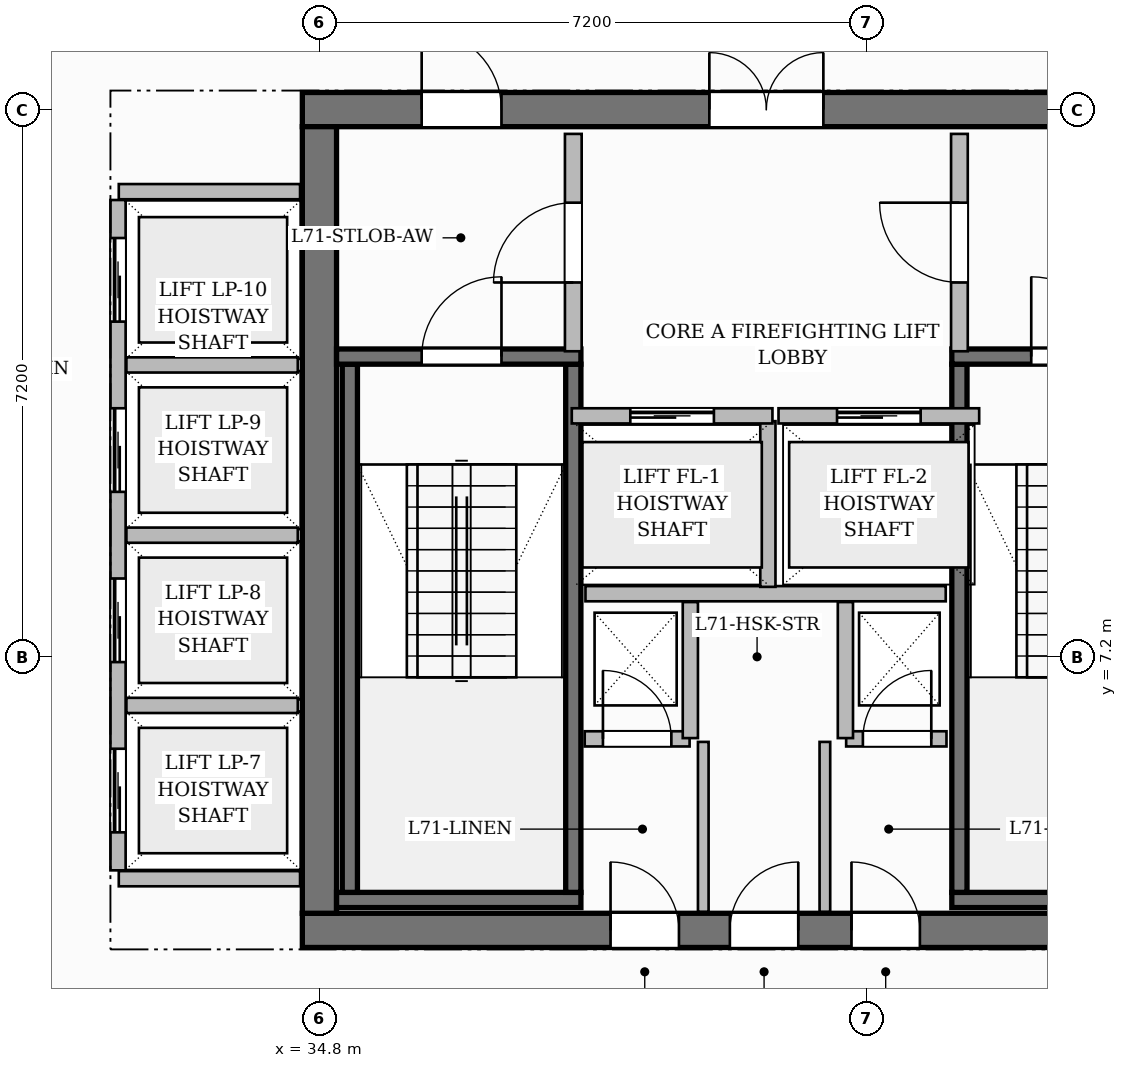
"""IFC4 building model, lengths in metres.
Left out: names, types, materials, properties, quantities, classifications, styles, units other than length and angle.
Written with IfcOpenShell. Run it as: python <this file> out.ifc"""

import sys

from ifc_helpers import new_model, si_unit, direction, frame, frame_2d, origin, place, context, subcontext, project, spatial, rectangle, extrude, source, transform, mapped, element, fill, save


model = new_model("IFC4")
c1 = context("Model", 3, precision=1e-05, world=origin(), true_north=direction((0.0, 1.0)))
c2 = subcontext(c1, "Body", "Model", "MODEL_VIEW")
j1 = project(units=[si_unit("LENGTHUNIT", "METRE"), si_unit("PLANEANGLEUNIT", "RADIAN")], contexts=[c1])
p1 = place(None, origin())
s1 = spatial("IfcSite", under=j1, at=p1, CompositionType="ELEMENT")
p2 = place(p1, origin())
s2 = spatial("IfcBuilding", under=s1, at=p2, CompositionType="ELEMENT")
p3 = place(p2, frame((0.0, 0.0, 282.75)))
s3 = spatial("IfcBuildingStorey", under=s2, at=p3, CompositionType="ELEMENT", Elevation=282.75)
p4 = place(p3, frame((34.575, 3.6, 0.0), z_axis=(0.0, 0.0, 1.0), x_axis=(1.0, 0.0, 0.0)))
e1 = element("IfcWall", 1, at=p4, inside=s3, PredefinedType="SHEAR", context=c2, shape_type="SweptSolid", body=[
    extrude(rectangle(XDim=15.45, YDim=0.45, at=frame_2d((7.725, 0.0))), origin(), (0.0, 0.0, 1.0), 3.85),
])
p5 = place(p4, frame((4.055, 0.0, 0.0)))
e2 = element("IfcOpeningElement", 2, at=p5, cuts=e1, PredefinedType="OPENING", context=c2, shape_type="SweptSolid", body=[
    extrude(rectangle(XDim=0.9, YDim=2.1, at=frame_2d((0.45, 1.05))), frame((0.0, 0.235, 0.0), z_axis=(0.0, -1.0, 0.0), x_axis=(1.0, 0.0, 0.0)), (0.0, 0.0, 1.0), 0.47),
])
p6 = place(p4, frame((5.625, 0.0, 0.0)))
e3 = element("IfcOpeningElement", 3, at=p6, cuts=e1, PredefinedType="OPENING", context=c2, shape_type="SweptSolid", body=[
    extrude(rectangle(XDim=0.9, YDim=2.1, at=frame_2d((0.45, 1.05))), frame((0.0, 0.235, 0.0), z_axis=(0.0, -1.0, 0.0), x_axis=(1.0, 0.0, 0.0)), (0.0, 0.0, 1.0), 0.47),
])
p7 = place(p4, frame((7.225, 0.0, 0.0)))
e4 = element("IfcOpeningElement", 4, at=p7, cuts=e1, PredefinedType="OPENING", context=c2, shape_type="SweptSolid", body=[
    extrude(rectangle(XDim=0.9, YDim=2.1, at=frame_2d((0.45, 1.05))), frame((0.0, 0.235, 0.0), z_axis=(0.0, -1.0, 0.0), x_axis=(1.0, 0.0, 0.0)), (0.0, 0.0, 1.0), 0.47),
])
p8 = place(p3, frame((34.575, 14.4, 0.0), z_axis=(0.0, 0.0, 1.0), x_axis=(1.0, 0.0, 0.0)))
e5 = element("IfcWall", 5, at=p8, inside=s3, PredefinedType="SHEAR", context=c2, shape_type="SweptSolid", body=[
    extrude(rectangle(XDim=15.45, YDim=0.45, at=frame_2d((7.725, 0.0))), origin(), (0.0, 0.0, 1.0), 3.85),
])
p9 = place(p8, frame((5.355, 0.0, 0.0)))
e6 = element("IfcOpeningElement", 6, at=p9, cuts=e5, PredefinedType="OPENING", context=c2, shape_type="SweptSolid", body=[
    extrude(rectangle(XDim=1.5, YDim=2.2, at=frame_2d((0.75, 1.1))), frame((0.0, 0.235, 0.0), z_axis=(0.0, -1.0, 0.0), x_axis=(1.0, 0.0, 0.0)), (0.0, 0.0, 1.0), 0.47),
])
p10 = place(p8, frame((1.57, 0.0, 0.0)))
e7 = element("IfcOpeningElement", 7, at=p10, cuts=e5, PredefinedType="OPENING", context=c2, shape_type="SweptSolid", body=[
    extrude(rectangle(XDim=1.05, YDim=2.15, at=frame_2d((0.525, 1.075))), frame((0.0, 0.235, 0.0), z_axis=(0.0, -1.0, 0.0), x_axis=(1.0, 0.0, 0.0)), (0.0, 0.0, 1.0), 0.47),
])
p11 = place(p8, frame((11.2, 0.0, 0.0)))
e8 = element("IfcOpeningElement", 8, at=p11, cuts=e5, PredefinedType="OPENING", context=c2, shape_type="SweptSolid", body=[
    extrude(rectangle(XDim=1.05, YDim=2.15, at=frame_2d((0.525, 1.075))), frame((0.0, 0.235, 0.0), z_axis=(0.0, -1.0, 0.0), x_axis=(1.0, 0.0, 0.0)), (0.0, 0.0, 1.0), 0.47),
])
p12 = place(p3, frame((34.8, 3.825, 0.0), z_axis=(0.0, 0.0, 1.0), x_axis=(0.0, 1.0, 0.0)))
e9 = element("IfcWall", 9, at=p12, inside=s3, PredefinedType="SHEAR", context=c2, shape_type="SweptSolid", body=[
    extrude(rectangle(XDim=10.35, YDim=0.45, at=frame_2d((5.175, 0.0))), origin(), (0.0, 0.0, 1.0), 3.85),
])
p13 = place(p3, frame((35.025, 4.0, 0.0), z_axis=(0.0, 0.0, 1.0), x_axis=(1.0, 0.0, 0.0)))
e10 = element("IfcWall", 10, at=p13, inside=s3, PredefinedType="SHEAR", context=c2, shape_type="SweptSolid", body=[
    extrude(rectangle(XDim=3.215, YDim=0.2, at=frame_2d((1.607, 0.0))), origin(), (0.0, 0.0, 1.0), 3.85),
])
for number, where, z_axis, x_axis in (
    (11, (35.2, 4.1, 0.0), (0.0, 0.0, 1.0), (0.0, 1.0, 0.0)),
    (12, (38.14, 4.1, 0.0), (0.0, 0.0, 1.0), (0.0, 1.0, 0.0)),
):
    element("IfcWall", number, at=place(p3, frame(where, z_axis=z_axis, x_axis=x_axis)), inside=s3, PredefinedType="SHEAR", context=c2, shape_type="SweptSolid", body=[
        extrude(rectangle(XDim=6.95, YDim=0.2, at=frame_2d((3.475, 0.0))), origin(), (0.0, 0.0, 1.0), 3.85),
    ])
p14 = place(p3, frame((35.025, 11.15, 0.0), z_axis=(0.0, 0.0, 1.0), x_axis=(1.0, 0.0, 0.0)))
e13 = element("IfcWall", 13, at=p14, inside=s3, PredefinedType="SHEAR", context=c2, shape_type="SweptSolid", body=[
    extrude(rectangle(XDim=3.215, YDim=0.2, at=frame_2d((1.607, 0.0))), origin(), (0.0, 0.0, 1.0), 3.85),
])
p15 = place(p14, frame((1.12, 0.0, 0.0)))
e14 = element("IfcOpeningElement", 14, at=p15, cuts=e13, PredefinedType="OPENING", context=c2, shape_type="SweptSolid", body=[
    extrude(rectangle(XDim=1.05, YDim=2.2, at=frame_2d((0.525, 1.1))), frame((0.0, 0.11, 0.0), z_axis=(0.0, -1.0, 0.0), x_axis=(1.0, 0.0, 0.0)), (0.0, 0.0, 1.0), 0.22),
])
p16 = place(p3, frame((43.12, 4.0, 0.0), z_axis=(0.0, 0.0, 1.0), x_axis=(1.0, 0.0, 0.0)))
e15 = element("IfcWall", 15, at=p16, inside=s3, PredefinedType="SHEAR", context=c2, shape_type="SweptSolid", body=[
    extrude(rectangle(XDim=6.455, YDim=0.2, at=frame_2d((3.228, 0.0))), origin(), (0.0, 0.0, 1.0), 3.85),
])
p17 = place(p3, frame((43.22, 4.1, 0.0), z_axis=(0.0, 0.0, 1.0), x_axis=(0.0, 1.0, 0.0)))
e16 = element("IfcWall", 16, at=p17, inside=s3, PredefinedType="SHEAR", context=c2, shape_type="SweptSolid", body=[
    extrude(rectangle(XDim=6.95, YDim=0.2, at=frame_2d((3.475, 0.0))), origin(), (0.0, 0.0, 1.0), 3.85),
])
p18 = place(p3, frame((43.12, 11.15, 0.0), z_axis=(0.0, 0.0, 1.0), x_axis=(1.0, 0.0, 0.0)))
e17 = element("IfcWall", 17, at=p18, inside=s3, PredefinedType="SHEAR", context=c2, shape_type="SweptSolid", body=[
    extrude(rectangle(XDim=6.455, YDim=0.2, at=frame_2d((3.228, 0.0))), origin(), (0.0, 0.0, 1.0), 3.85),
])
p19 = place(p18, frame((1.045, 0.0, 0.0)))
e18 = element("IfcOpeningElement", 18, at=p19, cuts=e17, PredefinedType="OPENING", context=c2, shape_type="SweptSolid", body=[
    extrude(rectangle(XDim=1.05, YDim=2.2, at=frame_2d((0.525, 1.1))), frame((0.0, 0.11, 0.0), z_axis=(0.0, -1.0, 0.0), x_axis=(1.0, 0.0, 0.0)), (0.0, 0.0, 1.0), 0.22),
])
p20 = place(p18, frame((4.125, 0.0, 0.0)))
e19 = element("IfcOpeningElement", 19, at=p20, cuts=e17, PredefinedType="OPENING", context=c2, shape_type="SweptSolid", body=[
    extrude(rectangle(XDim=1.05, YDim=2.2, at=frame_2d((0.525, 1.1))), frame((0.0, 0.11, 0.0), z_axis=(0.0, -1.0, 0.0), x_axis=(1.0, 0.0, 0.0)), (0.0, 0.0, 1.0), 0.22),
])
p21 = place(p3, frame((38.3, 8.03, 0.0), z_axis=(0.0, 0.0, 1.0), x_axis=(1.0, 0.0, 0.0)))
e20 = element("IfcWall", 20, at=p21, inside=s3, PredefinedType="PARTITIONING", context=c2, shape_type="SweptSolid", body=[
    extrude(rectangle(XDim=4.74, YDim=0.2, at=frame_2d((2.37, 0.0))), origin(), (0.0, 0.0, 1.0), 3.6),
])
p22 = place(p3, frame((40.7, 8.12, 0.0), z_axis=(0.0, 0.0, 1.0), x_axis=(0.0, 1.0, 0.0)))
e21 = element("IfcWall", 21, at=p22, inside=s3, PredefinedType="PARTITIONING", context=c2, shape_type="SweptSolid", body=[
    extrude(rectangle(XDim=2.18, YDim=0.2, at=frame_2d((1.09, 0.0))), origin(), (0.0, 0.0, 1.0), 3.6),
])
p23 = place(p3, frame((38.14, 11.22, 0.0), z_axis=(0.0, 0.0, 1.0), x_axis=(0.0, 1.0, 0.0)))
e22 = element("IfcWall", 22, at=p23, inside=s3, PredefinedType="PARTITIONING", context=c2, shape_type="SweptSolid", body=[
    extrude(rectangle(XDim=2.86, YDim=0.22, at=frame_2d((1.43, 0.0))), origin(), (0.0, 0.0, 1.0), 3.6),
])
p24 = place(p23, frame((0.905, 0.0, 0.0)))
e23 = element("IfcOpeningElement", 23, at=p24, cuts=e22, PredefinedType="OPENING", context=c2, shape_type="SweptSolid", body=[
    extrude(rectangle(XDim=1.05, YDim=2.15, at=frame_2d((0.525, 1.075))), frame((0.0, 0.12, 0.0), z_axis=(0.0, -1.0, 0.0), x_axis=(1.0, 0.0, 0.0)), (0.0, 0.0, 1.0), 0.24),
])
p25 = place(p3, frame((43.22, 11.22, 0.0), z_axis=(0.0, 0.0, 1.0), x_axis=(0.0, 1.0, 0.0)))
e24 = element("IfcWall", 24, at=p25, inside=s3, PredefinedType="PARTITIONING", context=c2, shape_type="SweptSolid", body=[
    extrude(rectangle(XDim=2.86, YDim=0.22, at=frame_2d((1.43, 0.0))), origin(), (0.0, 0.0, 1.0), 3.6),
])
p26 = place(p25, frame((0.905, 0.0, 0.0)))
e25 = element("IfcOpeningElement", 25, at=p26, cuts=e24, PredefinedType="OPENING", context=c2, shape_type="SweptSolid", body=[
    extrude(rectangle(XDim=1.05, YDim=2.15, at=frame_2d((0.525, 1.075))), frame((0.0, 0.12, 0.0), z_axis=(0.0, -1.0, 0.0), x_axis=(1.0, 0.0, 0.0)), (0.0, 0.0, 1.0), 0.24),
])
p27 = place(p3, frame((38.29, 6.12, 0.0), z_axis=(0.0, 0.0, 1.0), x_axis=(1.0, 0.0, 0.0)))
e26 = element("IfcWall", 26, at=p27, inside=s3, PredefinedType="PARTITIONING", context=c2, shape_type="SweptSolid", body=[
    extrude(rectangle(XDim=1.38, YDim=0.2, at=frame_2d((0.69, 0.0))), origin(), (0.0, 0.0, 1.0), 3.6),
])
p28 = place(p27, frame((0.24, 0.0, 0.0)))
e27 = element("IfcOpeningElement", 27, at=p28, cuts=e26, PredefinedType="OPENING", context=c2, shape_type="SweptSolid", body=[
    extrude(rectangle(XDim=0.9, YDim=2.1, at=frame_2d((0.45, 1.05))), frame((0.0, 0.11, 0.0), z_axis=(0.0, -1.0, 0.0), x_axis=(1.0, 0.0, 0.0)), (0.0, 0.0, 1.0), 0.22),
])
p29 = place(p3, frame((39.68, 6.13, 0.0), z_axis=(0.0, 0.0, 1.0), x_axis=(0.0, 1.0, 0.0)))
e28 = element("IfcWall", 28, at=p29, inside=s3, PredefinedType="PARTITIONING", context=c2, shape_type="SweptSolid", body=[
    extrude(rectangle(XDim=1.79, YDim=0.2, at=frame_2d((0.895, 0.0))), origin(), (0.0, 0.0, 1.0), 3.6),
])
p30 = place(p3, frame((41.73, 6.12, 0.0), z_axis=(0.0, 0.0, 1.0), x_axis=(1.0, 0.0, 0.0)))
e29 = element("IfcWall", 29, at=p30, inside=s3, PredefinedType="PARTITIONING", context=c2, shape_type="SweptSolid", body=[
    extrude(rectangle(XDim=1.32, YDim=0.2, at=frame_2d((0.66, 0.0))), origin(), (0.0, 0.0, 1.0), 3.6),
])
p31 = place(p30, frame((0.22, 0.0, 0.0)))
e30 = element("IfcOpeningElement", 30, at=p31, cuts=e29, PredefinedType="OPENING", context=c2, shape_type="SweptSolid", body=[
    extrude(rectangle(XDim=0.9, YDim=2.1, at=frame_2d((0.45, 1.05))), frame((0.0, 0.11, 0.0), z_axis=(0.0, -1.0, 0.0), x_axis=(1.0, 0.0, 0.0)), (0.0, 0.0, 1.0), 0.22),
])
p32 = place(p3, frame((41.72, 6.13, 0.0), z_axis=(0.0, 0.0, 1.0), x_axis=(0.0, 1.0, 0.0)))
e31 = element("IfcWall", 31, at=p32, inside=s3, PredefinedType="PARTITIONING", context=c2, shape_type="SweptSolid", body=[
    extrude(rectangle(XDim=1.79, YDim=0.2, at=frame_2d((0.895, 0.0))), origin(), (0.0, 0.0, 1.0), 3.6),
])
for number, where, z_axis, x_axis in (
    (32, (39.85, 3.845, 0.0), (0.0, 0.0, 1.0), (0.0, 1.0, 0.0)),
    (33, (41.45, 3.845, 0.0), (0.0, 0.0, 1.0), (0.0, 1.0, 0.0)),
):
    element("IfcWall", number, at=place(p3, frame(where, z_axis=z_axis, x_axis=x_axis)), inside=s3, PredefinedType="PARTITIONING", context=c2, shape_type="SweptSolid", body=[
        extrude(rectangle(XDim=2.235, YDim=0.14, at=frame_2d((1.118, 0.0))), origin(), (0.0, 0.0, 1.0), 3.6),
    ])
for number, where, z_axis, x_axis in (
    (34, (32.16, 4.28, 0.0), (0.0, 0.0, 1.0), (1.0, 0.0, 0.0)),
    (35, (32.16, 13.32, 0.0), (0.0, 0.0, 1.0), (1.0, 0.0, 0.0)),
):
    element("IfcWall", number, at=place(p3, frame(where, z_axis=z_axis, x_axis=x_axis)), inside=s3, PredefinedType="PARTITIONING", context=c2, shape_type="SweptSolid", body=[
        extrude(rectangle(XDim=2.385, YDim=0.2, at=frame_2d((1.192, 0.0))), origin(), (0.0, 0.0, 1.0), 3.6),
    ])
p33 = place(p3, frame((32.15, 4.39, 0.0), z_axis=(0.0, 0.0, 1.0), x_axis=(0.0, 1.0, 0.0)))
e36 = element("IfcWall", 36, at=p33, inside=s3, PredefinedType="PARTITIONING", context=c2, shape_type="SweptSolid", body=[
    extrude(rectangle(XDim=8.82, YDim=0.2, at=frame_2d((4.41, 0.0))), origin(), (0.0, 0.0, 1.0), 3.6),
])
p34 = place(p33, frame((0.5, 0.0, 0.0)))
e37 = element("IfcOpeningElement", 37, at=p34, cuts=e36, PredefinedType="OPENING", context=c2, shape_type="SweptSolid", body=[
    extrude(rectangle(XDim=1.1, YDim=2.2, at=frame_2d((0.55, 1.1))), frame((0.0, 0.11, 0.0), z_axis=(0.0, -1.0, 0.0), x_axis=(1.0, 0.0, 0.0)), (0.0, 0.0, 1.0), 0.22),
])
p35 = place(p33, frame((2.74, 0.0, 0.0)))
e38 = element("IfcOpeningElement", 38, at=p35, cuts=e36, PredefinedType="OPENING", context=c2, shape_type="SweptSolid", body=[
    extrude(rectangle(XDim=1.1, YDim=2.2, at=frame_2d((0.55, 1.1))), frame((0.0, 0.11, 0.0), z_axis=(0.0, -1.0, 0.0), x_axis=(1.0, 0.0, 0.0)), (0.0, 0.0, 1.0), 0.22),
])
p36 = place(p33, frame((4.98, 0.0, 0.0)))
e39 = element("IfcOpeningElement", 39, at=p36, cuts=e36, PredefinedType="OPENING", context=c2, shape_type="SweptSolid", body=[
    extrude(rectangle(XDim=1.1, YDim=2.2, at=frame_2d((0.55, 1.1))), frame((0.0, 0.11, 0.0), z_axis=(0.0, -1.0, 0.0), x_axis=(1.0, 0.0, 0.0)), (0.0, 0.0, 1.0), 0.22),
])
p37 = place(p33, frame((7.22, 0.0, 0.0)))
e40 = element("IfcOpeningElement", 40, at=p37, cuts=e36, PredefinedType="OPENING", context=c2, shape_type="SweptSolid", body=[
    extrude(rectangle(XDim=1.1, YDim=2.2, at=frame_2d((0.55, 1.1))), frame((0.0, 0.11, 0.0), z_axis=(0.0, -1.0, 0.0), x_axis=(1.0, 0.0, 0.0)), (0.0, 0.0, 1.0), 0.22),
])
for number, where, z_axis, x_axis in (
    (41, (32.26, 6.56, 0.0), (0.0, 0.0, 1.0), (1.0, 0.0, 0.0)),
    (42, (32.26, 8.8, 0.0), (0.0, 0.0, 1.0), (1.0, 0.0, 0.0)),
    (43, (32.26, 11.04, 0.0), (0.0, 0.0, 1.0), (1.0, 0.0, 0.0)),
):
    element("IfcWall", number, at=place(p3, frame(where, z_axis=z_axis, x_axis=x_axis)), inside=s3, PredefinedType="PARTITIONING", context=c2, shape_type="SweptSolid", body=[
        extrude(rectangle(XDim=2.255, YDim=0.2, at=frame_2d((1.127, 0.0))), origin(), (0.0, 0.0, 1.0), 3.6),
    ])
p38 = place(p3, frame((38.12, 10.37, 0.0), z_axis=(0.0, 0.0, 1.0), x_axis=(1.0, 0.0, 0.0)))
e44 = element("IfcWall", 44, at=p38, inside=s3, PredefinedType="PARTITIONING", context=c2, shape_type="SweptSolid", body=[
    extrude(rectangle(XDim=2.64, YDim=0.2, at=frame_2d((1.32, 0.0))), origin(), (0.0, 0.0, 1.0), 3.6),
])
p39 = place(p38, frame((0.77, 0.0, 0.0)))
e45 = element("IfcOpeningElement", 45, at=p39, cuts=e44, PredefinedType="OPENING", context=c2, shape_type="SweptSolid", body=[
    extrude(rectangle(XDim=1.1, YDim=2.2, at=frame_2d((0.55, 1.1))), frame((0.0, 0.11, 0.0), z_axis=(0.0, -1.0, 0.0), x_axis=(1.0, 0.0, 0.0)), (0.0, 0.0, 1.0), 0.22),
])
p40 = place(p3, frame((40.84, 10.37, 0.0), z_axis=(0.0, 0.0, 1.0), x_axis=(1.0, 0.0, 0.0)))
e46 = element("IfcWall", 46, at=p40, inside=s3, PredefinedType="PARTITIONING", context=c2, shape_type="SweptSolid", body=[
    extrude(rectangle(XDim=2.64, YDim=0.2, at=frame_2d((1.32, 0.0))), origin(), (0.0, 0.0, 1.0), 3.6),
])
p41 = place(p40, frame((0.77, 0.0, 0.0)))
e47 = element("IfcOpeningElement", 47, at=p41, cuts=e46, PredefinedType="OPENING", context=c2, shape_type="SweptSolid", body=[
    extrude(rectangle(XDim=1.1, YDim=2.2, at=frame_2d((0.55, 1.1))), frame((0.0, 0.11, 0.0), z_axis=(0.0, -1.0, 0.0), x_axis=(1.0, 0.0, 0.0)), (0.0, 0.0, 1.0), 0.22),
])
m1 = source(origin(), c2, "Body", "SweptSolid", [
    extrude(rectangle(XDim=1.05, YDim=2.2, at=frame_2d((0.525, 1.1))), frame((0.0, 0.025, 0.0), z_axis=(0.0, -1.0, 0.0), x_axis=(1.0, 0.0, 0.0)), (0.0, 0.0, 1.0), 0.05),
])
p42 = place(p15, origin())
e48 = element("IfcDoor", 48, at=p42, inside=s3, OperationType="SINGLE_SWING_RIGHT", PredefinedType="DOOR", context=c2, shape_type="MappedRepresentation", body=[
    mapped(m1, transform((0.0, 0.0, 0.0), scale=1.0)),
])
fill(e14, e48)
p43 = place(p19, origin())
e49 = element("IfcDoor", 49, at=p43, inside=s3, OperationType="SINGLE_SWING_LEFT", PredefinedType="DOOR", context=c2, shape_type="MappedRepresentation", body=[
    mapped(m1, transform((0.0, 0.0, 0.0), scale=1.0)),
])
fill(e18, e49)
m2 = source(origin(), c2, "Body", "SweptSolid", [
    extrude(rectangle(XDim=1.05, YDim=2.15, at=frame_2d((0.525, 1.075))), frame((0.0, 0.025, 0.0), z_axis=(0.0, -1.0, 0.0), x_axis=(1.0, 0.0, 0.0)), (0.0, 0.0, 1.0), 0.05),
])
p44 = place(p24, origin())
e50 = element("IfcDoor", 50, at=p44, inside=s3, OperationType="SINGLE_SWING_LEFT", PredefinedType="DOOR", context=c2, shape_type="MappedRepresentation", body=[
    mapped(m2, transform((0.0, 0.0, 0.0), scale=1.0)),
])
fill(e23, e50)
p45 = place(p26, origin())
e51 = element("IfcDoor", 51, at=p45, inside=s3, OperationType="SINGLE_SWING_RIGHT", PredefinedType="DOOR", context=c2, shape_type="MappedRepresentation", body=[
    mapped(m2, transform((0.0, 0.0, 0.0), scale=1.0)),
])
fill(e25, e51)
m3 = source(origin(), c2, "Body", "SweptSolid", [
    extrude(rectangle(XDim=1.5, YDim=2.2, at=frame_2d((0.75, 1.1))), frame((0.0, 0.025, 0.0), z_axis=(0.0, -1.0, 0.0), x_axis=(1.0, 0.0, 0.0)), (0.0, 0.0, 1.0), 0.05),
])
p46 = place(p9, origin())
e52 = element("IfcDoor", 52, at=p46, inside=s3, OperationType="DOUBLE_DOOR_SINGLE_SWING", PredefinedType="DOOR", context=c2, shape_type="MappedRepresentation", body=[
    mapped(m3, transform((0.0, 0.0, 0.0), scale=1.0)),
])
fill(e6, e52)
p47 = place(p10, origin())
e53 = element("IfcDoor", 53, at=p47, inside=s3, OperationType="SINGLE_SWING_LEFT", PredefinedType="DOOR", context=c2, shape_type="MappedRepresentation", body=[
    mapped(m2, transform((0.0, 0.0, 0.0), scale=1.0)),
])
fill(e7, e53)
m4 = source(origin(), c2, "Body", "SweptSolid", [
    extrude(rectangle(XDim=0.9, YDim=2.1, at=frame_2d((0.45, 1.05))), frame((0.0, 0.025, 0.0), z_axis=(0.0, -1.0, 0.0), x_axis=(1.0, 0.0, 0.0)), (0.0, 0.0, 1.0), 0.05),
])
p48 = place(p28, origin())
e54 = element("IfcDoor", 54, at=p48, inside=s3, OperationType="SINGLE_SWING_LEFT", PredefinedType="DOOR", context=c2, shape_type="MappedRepresentation", body=[
    mapped(m4, transform((0.0, 0.0, 0.0), scale=1.0)),
])
fill(e27, e54)
p49 = place(p31, origin())
e55 = element("IfcDoor", 55, at=p49, inside=s3, OperationType="SINGLE_SWING_RIGHT", PredefinedType="DOOR", context=c2, shape_type="MappedRepresentation", body=[
    mapped(m4, transform((0.0, 0.0, 0.0), scale=1.0)),
])
fill(e30, e55)
p50 = place(p5, origin())
e56 = element("IfcDoor", 56, at=p50, inside=s3, OperationType="SINGLE_SWING_LEFT", PredefinedType="DOOR", context=c2, shape_type="MappedRepresentation", body=[
    mapped(m4, transform((0.0, 0.0, 0.0), scale=1.0)),
])
fill(e2, e56)
p51 = place(p6, origin())
e57 = element("IfcDoor", 57, at=p51, inside=s3, OperationType="SINGLE_SWING_RIGHT", PredefinedType="DOOR", context=c2, shape_type="MappedRepresentation", body=[
    mapped(m4, transform((0.0, 0.0, 0.0), scale=1.0)),
])
fill(e3, e57)
p52 = place(p7, origin())
e58 = element("IfcDoor", 58, at=p52, inside=s3, OperationType="SINGLE_SWING_LEFT", PredefinedType="DOOR", context=c2, shape_type="MappedRepresentation", body=[
    mapped(m4, transform((0.0, 0.0, 0.0), scale=1.0)),
])
fill(e4, e58)
m5 = source(origin(), c2, "Body", "SweptSolid", [
    extrude(rectangle(XDim=1.1, YDim=2.2, at=frame_2d((0.55, 1.1))), frame((0.0, 0.025, 0.0), z_axis=(0.0, -1.0, 0.0), x_axis=(1.0, 0.0, 0.0)), (0.0, 0.0, 1.0), 0.05),
])
p53 = place(p39, origin())
e59 = element("IfcDoor", 59, at=p53, inside=s3, OperationType="SLIDING_TO_LEFT", PredefinedType="DOOR", context=c2, shape_type="MappedRepresentation", body=[
    mapped(m5, transform((0.0, 0.0, 0.0), scale=1.0)),
])
fill(e45, e59)
p54 = place(p41, origin())
e60 = element("IfcDoor", 60, at=p54, inside=s3, OperationType="SLIDING_TO_LEFT", PredefinedType="DOOR", context=c2, shape_type="MappedRepresentation", body=[
    mapped(m5, transform((0.0, 0.0, 0.0), scale=1.0)),
])
fill(e47, e60)
p55 = place(p34, origin())
e61 = element("IfcDoor", 61, at=p55, inside=s3, OperationType="SLIDING_TO_LEFT", PredefinedType="DOOR", context=c2, shape_type="MappedRepresentation", body=[
    mapped(m5, transform((0.0, 0.0, 0.0), scale=1.0)),
])
fill(e37, e61)
p56 = place(p35, origin())
e62 = element("IfcDoor", 62, at=p56, inside=s3, OperationType="SLIDING_TO_LEFT", PredefinedType="DOOR", context=c2, shape_type="MappedRepresentation", body=[
    mapped(m5, transform((0.0, 0.0, 0.0), scale=1.0)),
])
fill(e38, e62)
p57 = place(p36, origin())
e63 = element("IfcDoor", 63, at=p57, inside=s3, OperationType="SLIDING_TO_LEFT", PredefinedType="DOOR", context=c2, shape_type="MappedRepresentation", body=[
    mapped(m5, transform((0.0, 0.0, 0.0), scale=1.0)),
])
fill(e39, e63)
p58 = place(p37, origin())
e64 = element("IfcDoor", 64, at=p58, inside=s3, OperationType="SLIDING_TO_LEFT", PredefinedType="DOOR", context=c2, shape_type="MappedRepresentation", body=[
    mapped(m5, transform((0.0, 0.0, 0.0), scale=1.0)),
])
fill(e40, e64)
save(model, sys.argv[1])
